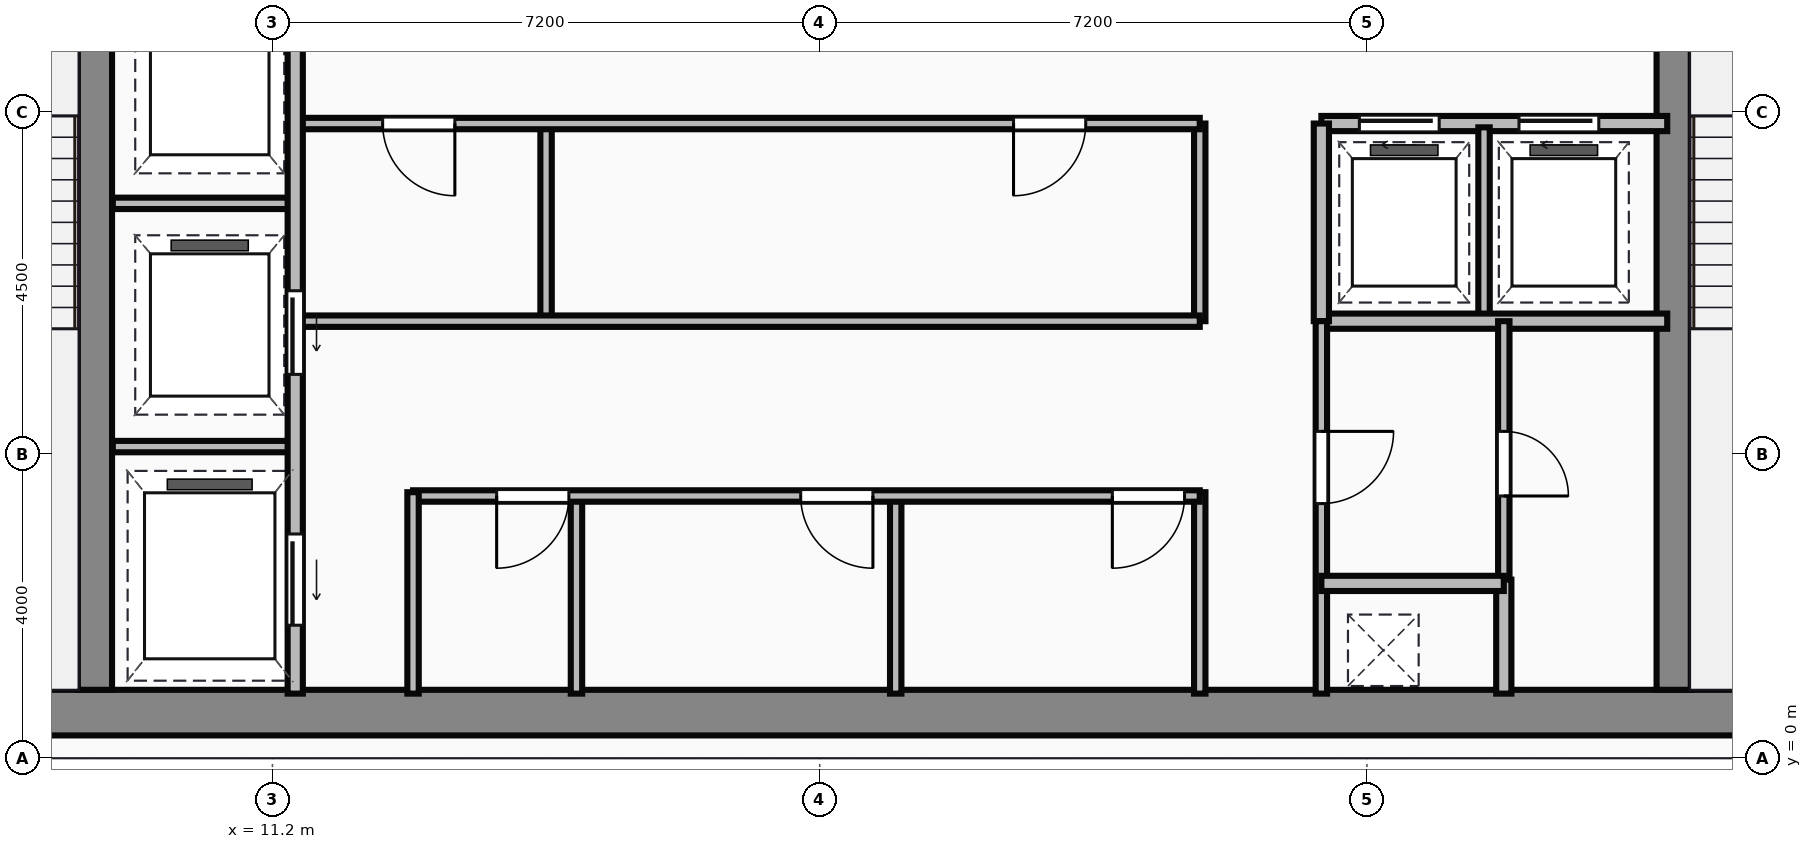
"""IFC4 building model, lengths in metres.
Left out: names, types, materials, properties, quantities, classifications, styles, units other than length and angle.
Written with IfcOpenShell. Run it as: python <this file> out.ifc"""

import sys

from ifc_helpers import new_model, si_unit, direction, frame, frame_2d, origin, place, context, subcontext, project, spatial, rectangle, extrude, source, transform, mapped, element, fill, save


model = new_model("IFC4")
c1 = context("Model", 3, precision=1e-05, world=origin(), true_north=direction((0.0, 1.0)))
c2 = subcontext(c1, "Body", "Model", "MODEL_VIEW")
j1 = project(units=[si_unit("LENGTHUNIT", "METRE"), si_unit("PLANEANGLEUNIT", "RADIAN")], contexts=[c1])
p1 = place(None, origin())
s1 = spatial("IfcSite", under=j1, at=p1, CompositionType="ELEMENT")
p2 = place(p1, origin())
s2 = spatial("IfcBuilding", under=s1, at=p2, CompositionType="ELEMENT")
p3 = place(p2, frame((0.0, 0.0, 206.85)))
s3 = spatial("IfcBuildingStorey", under=s2, at=p3, CompositionType="ELEMENT", Elevation=206.85)
m1 = source(origin(), c2, "Body", "SweptSolid", [
    extrude(rectangle(XDim=29.5, YDim=0.6, at=frame_2d((14.75, 0.0))), origin(), (0.0, 0.0, 1.0), 3.65),
])
p4 = place(p3, frame((4.5, 0.6, 0.0), z_axis=(0.0, 0.0, 1.0), x_axis=(1.0, 0.0, 0.0)))
e1 = element("IfcWall", 1, at=p4, inside=s3, PredefinedType="SHEAR", context=c2, shape_type="MappedRepresentation", body=[
    mapped(m1, transform((0.0, 0.0, 0.0))),
])
m2 = source(origin(), c2, "Body", "SweptSolid", [
    extrude(rectangle(XDim=12.5, YDim=0.45, at=frame_2d((6.25, 0.0))), origin(), (0.0, 0.0, 1.0), 3.65),
])
for number, where, z_axis, x_axis in (
    (2, (8.865, 0.9, 0.0), (0.0, 0.0, 1.0), (0.0, 1.0, 0.0)),
    (3, (29.635, 0.9, 0.0), (0.0, 0.0, 1.0), (0.0, 1.0, 0.0)),
):
    element("IfcWall", number, at=place(p3, frame(where, z_axis=z_axis, x_axis=x_axis)), inside=s3, PredefinedType="SHEAR", context=c2, shape_type="MappedRepresentation", body=[
        mapped(m2, transform((0.0, 0.0, 0.0))),
    ])
m3 = source(origin(), c2, "Body", "SweptSolid", [
    extrude(rectangle(XDim=9.6, YDim=0.2, at=frame_2d((4.8, 0.0))), origin(), (0.0, 0.0, 1.0), 3.4),
])
p5 = place(p3, frame((11.5, 0.85, 0.0), z_axis=(0.0, 0.0, 1.0), x_axis=(0.0, 1.0, 0.0)))
e4 = element("IfcWall", 4, at=p5, inside=s3, PredefinedType="PARTITIONING", context=c2, shape_type="MappedRepresentation", body=[
    mapped(m3, transform((0.0, 0.0, 0.0))),
])
p6 = place(p5, frame((4.2, 0.0, 0.0)))
e5 = element("IfcOpeningElement", 5, at=p6, cuts=e4, PredefinedType="OPENING", context=c2, shape_type="SweptSolid", body=[
    extrude(rectangle(XDim=1.1, YDim=2.15, at=frame_2d((0.55, 1.075))), frame((0.0, 0.11, 0.0), z_axis=(0.0, -1.0, 0.0), x_axis=(1.0, 0.0, 0.0)), (0.0, 0.0, 1.0), 0.22),
])
p7 = place(p5, frame((0.9, 0.0, 0.0)))
e6 = element("IfcOpeningElement", 6, at=p7, cuts=e4, PredefinedType="OPENING", context=c2, shape_type="SweptSolid", body=[
    extrude(rectangle(XDim=1.2, YDim=2.15, at=frame_2d((0.6, 1.075))), frame((0.0, 0.11, 0.0), z_axis=(0.0, -1.0, 0.0), x_axis=(1.0, 0.0, 0.0)), (0.0, 0.0, 1.0), 0.22),
])
m4 = source(origin(), c2, "Body", "SweptSolid", [
    extrude(rectangle(XDim=2.4, YDim=0.15, at=frame_2d((1.2, 0.0))), origin(), (0.0, 0.0, 1.0), 3.4),
])
for number, where, z_axis, x_axis in (
    (7, (9.1, 4.1, 0.0), (0.0, 0.0, 1.0), (1.0, 0.0, 0.0)),
    (8, (9.1, 7.3, 0.0), (0.0, 0.0, 1.0), (1.0, 0.0, 0.0)),
):
    element("IfcWall", number, at=place(p3, frame(where, z_axis=z_axis, x_axis=x_axis)), inside=s3, PredefinedType="PARTITIONING", context=c2, shape_type="MappedRepresentation", body=[
        mapped(m4, transform((0.0, 0.0, 0.0))),
    ])
m5 = source(origin(), c2, "Body", "SweptSolid", [
    extrude(rectangle(XDim=2.65, YDim=0.15, at=frame_2d((1.325, 0.0))), origin(), (0.0, 0.0, 1.0), 3.4),
])
p8 = place(p3, frame((13.05, 0.85, 0.0), z_axis=(0.0, 0.0, 1.0), x_axis=(0.0, 1.0, 0.0)))
e9 = element("IfcWall", 9, at=p8, inside=s3, PredefinedType="PARTITIONING", context=c2, shape_type="MappedRepresentation", body=[
    mapped(m5, transform((0.0, 0.0, 0.0))),
])
m6 = source(origin(), c2, "Body", "SweptSolid", [
    extrude(rectangle(XDim=10.35, YDim=0.15, at=frame_2d((5.175, 0.0))), origin(), (0.0, 0.0, 1.0), 3.4),
])
p9 = place(p3, frame((13.05, 3.45, 0.0), z_axis=(0.0, 0.0, 1.0), x_axis=(1.0, 0.0, 0.0)))
e10 = element("IfcWall", 10, at=p9, inside=s3, PredefinedType="PARTITIONING", context=c2, shape_type="MappedRepresentation", body=[
    mapped(m6, transform((0.0, 0.0, 0.0))),
])
p10 = place(p9, frame((1.1, 0.0, 0.0)))
e11 = element("IfcOpeningElement", 11, at=p10, cuts=e10, PredefinedType="OPENING", context=c2, shape_type="SweptSolid", body=[
    extrude(rectangle(XDim=0.95, YDim=2.15, at=frame_2d((0.475, 1.075))), frame((0.0, 0.085, 0.0), z_axis=(0.0, -1.0, 0.0), x_axis=(1.0, 0.0, 0.0)), (0.0, 0.0, 1.0), 0.17),
])
p11 = place(p9, frame((5.1, 0.0, 0.0)))
e12 = element("IfcOpeningElement", 12, at=p11, cuts=e10, PredefinedType="OPENING", context=c2, shape_type="SweptSolid", body=[
    extrude(rectangle(XDim=0.95, YDim=2.15, at=frame_2d((0.475, 1.075))), frame((0.0, 0.085, 0.0), z_axis=(0.0, -1.0, 0.0), x_axis=(1.0, 0.0, 0.0)), (0.0, 0.0, 1.0), 0.17),
])
p12 = place(p9, frame((9.2, 0.0, 0.0)))
e13 = element("IfcOpeningElement", 13, at=p12, cuts=e10, PredefinedType="OPENING", context=c2, shape_type="SweptSolid", body=[
    extrude(rectangle(XDim=0.95, YDim=2.15, at=frame_2d((0.475, 1.075))), frame((0.0, 0.085, 0.0), z_axis=(0.0, -1.0, 0.0), x_axis=(1.0, 0.0, 0.0)), (0.0, 0.0, 1.0), 0.17),
])
p13 = place(p3, frame((23.4, 0.85, 0.0), z_axis=(0.0, 0.0, 1.0), x_axis=(0.0, 1.0, 0.0)))
e14 = element("IfcWall", 14, at=p13, inside=s3, PredefinedType="PARTITIONING", context=c2, shape_type="MappedRepresentation", body=[
    mapped(m5, transform((0.0, 0.0, 0.0))),
])
m7 = source(origin(), c2, "Body", "SweptSolid", [
    extrude(rectangle(XDim=2.6, YDim=0.15, at=frame_2d((1.3, 0.0))), origin(), (0.0, 0.0, 1.0), 3.4),
])
for number, where, z_axis, x_axis in (
    (15, (15.2, 0.85, 0.0), (0.0, 0.0, 1.0), (0.0, 1.0, 0.0)),
    (16, (19.4, 0.85, 0.0), (0.0, 0.0, 1.0), (0.0, 1.0, 0.0)),
):
    element("IfcWall", number, at=place(p3, frame(where, z_axis=z_axis, x_axis=x_axis)), inside=s3, PredefinedType="PARTITIONING", context=c2, shape_type="MappedRepresentation", body=[
        mapped(m7, transform((0.0, 0.0, 0.0))),
    ])
m8 = source(origin(), c2, "Body", "SweptSolid", [
    extrude(rectangle(XDim=11.85, YDim=0.15, at=frame_2d((5.925, 0.0))), origin(), (0.0, 0.0, 1.0), 3.4),
])
p14 = place(p3, frame((11.55, 5.75, 0.0), z_axis=(0.0, 0.0, 1.0), x_axis=(1.0, 0.0, 0.0)))
e17 = element("IfcWall", 17, at=p14, inside=s3, PredefinedType="PARTITIONING", context=c2, shape_type="MappedRepresentation", body=[
    mapped(m8, transform((0.0, 0.0, 0.0))),
])
p15 = place(p3, frame((11.55, 8.35, 0.0), z_axis=(0.0, 0.0, 1.0), x_axis=(1.0, 0.0, 0.0)))
e18 = element("IfcWall", 18, at=p15, inside=s3, PredefinedType="PARTITIONING", context=c2, shape_type="MappedRepresentation", body=[
    mapped(m8, transform((0.0, 0.0, 0.0))),
])
p16 = place(p15, frame((1.1, 0.0, 0.0)))
e19 = element("IfcOpeningElement", 19, at=p16, cuts=e18, PredefinedType="OPENING", context=c2, shape_type="SweptSolid", body=[
    extrude(rectangle(XDim=0.95, YDim=2.15, at=frame_2d((0.475, 1.075))), frame((0.0, 0.085, 0.0), z_axis=(0.0, -1.0, 0.0), x_axis=(1.0, 0.0, 0.0)), (0.0, 0.0, 1.0), 0.17),
])
p17 = place(p15, frame((9.4, 0.0, 0.0)))
e20 = element("IfcOpeningElement", 20, at=p17, cuts=e18, PredefinedType="OPENING", context=c2, shape_type="SweptSolid", body=[
    extrude(rectangle(XDim=0.95, YDim=2.15, at=frame_2d((0.475, 1.075))), frame((0.0, 0.085, 0.0), z_axis=(0.0, -1.0, 0.0), x_axis=(1.0, 0.0, 0.0)), (0.0, 0.0, 1.0), 0.17),
])
m9 = source(origin(), c2, "Body", "SweptSolid", [
    extrude(rectangle(XDim=2.6, YDim=0.15, at=frame_2d((1.3, 0.0))), origin(), (0.0, 0.0, 1.0), 3.4),
])
p18 = place(p3, frame((23.4, 5.75, 0.0), z_axis=(0.0, 0.0, 1.0), x_axis=(0.0, 1.0, 0.0)))
e21 = element("IfcWall", 21, at=p18, inside=s3, PredefinedType="PARTITIONING", context=c2, shape_type="MappedRepresentation", body=[
    mapped(m9, transform((0.0, 0.0, 0.0))),
])
m10 = source(origin(), c2, "Body", "SweptSolid", [
    extrude(rectangle(XDim=2.5, YDim=0.15, at=frame_2d((1.25, 0.0))), origin(), (0.0, 0.0, 1.0), 3.4),
])
p19 = place(p3, frame((14.8, 5.8, 0.0), z_axis=(0.0, 0.0, 1.0), x_axis=(0.0, 1.0, 0.0)))
e22 = element("IfcWall", 22, at=p19, inside=s3, PredefinedType="PARTITIONING", context=c2, shape_type="MappedRepresentation", body=[
    mapped(m10, transform((0.0, 0.0, 0.0))),
])
m11 = source(origin(), c2, "Body", "SweptSolid", [
    extrude(rectangle(XDim=4.55, YDim=0.2, at=frame_2d((2.275, 0.0))), origin(), (0.0, 0.0, 1.0), 3.4),
])
p20 = place(p3, frame((25.0, 8.35, 0.0), z_axis=(0.0, 0.0, 1.0), x_axis=(1.0, 0.0, 0.0)))
e23 = element("IfcWall", 23, at=p20, inside=s3, PredefinedType="PARTITIONING", context=c2, shape_type="MappedRepresentation", body=[
    mapped(m11, transform((0.0, 0.0, 0.0))),
])
p21 = place(p20, frame((0.5, 0.0, 0.0)))
e24 = element("IfcOpeningElement", 24, at=p21, cuts=e23, PredefinedType="OPENING", context=c2, shape_type="SweptSolid", body=[
    extrude(rectangle(XDim=1.05, YDim=2.15, at=frame_2d((0.525, 1.075))), frame((0.0, 0.11, 0.0), z_axis=(0.0, -1.0, 0.0), x_axis=(1.0, 0.0, 0.0)), (0.0, 0.0, 1.0), 0.22),
])
p22 = place(p20, frame((2.6, 0.0, 0.0)))
e25 = element("IfcOpeningElement", 25, at=p22, cuts=e23, PredefinedType="OPENING", context=c2, shape_type="SweptSolid", body=[
    extrude(rectangle(XDim=1.05, YDim=2.15, at=frame_2d((0.525, 1.075))), frame((0.0, 0.11, 0.0), z_axis=(0.0, -1.0, 0.0), x_axis=(1.0, 0.0, 0.0)), (0.0, 0.0, 1.0), 0.22),
])
p23 = place(p3, frame((25.0, 5.75, 0.0), z_axis=(0.0, 0.0, 1.0), x_axis=(1.0, 0.0, 0.0)))
e26 = element("IfcWall", 26, at=p23, inside=s3, PredefinedType="PARTITIONING", context=c2, shape_type="MappedRepresentation", body=[
    mapped(m11, transform((0.0, 0.0, 0.0))),
])
m12 = source(origin(), c2, "Body", "SweptSolid", [
    extrude(rectangle(XDim=2.6, YDim=0.2, at=frame_2d((1.3, 0.0))), origin(), (0.0, 0.0, 1.0), 3.4),
])
p24 = place(p3, frame((25.0, 5.75, 0.0), z_axis=(0.0, 0.0, 1.0), x_axis=(0.0, 1.0, 0.0)))
e27 = element("IfcWall", 27, at=p24, inside=s3, PredefinedType="PARTITIONING", context=c2, shape_type="MappedRepresentation", body=[
    mapped(m12, transform((0.0, 0.0, 0.0))),
])
p25 = place(p3, frame((27.14, 5.8, 0.0), z_axis=(0.0, 0.0, 1.0), x_axis=(0.0, 1.0, 0.0)))
e28 = element("IfcWall", 28, at=p25, inside=s3, PredefinedType="PARTITIONING", context=c2, shape_type="MappedRepresentation", body=[
    mapped(m10, transform((0.0, 0.0, 0.0))),
])
m13 = source(origin(), c2, "Body", "SweptSolid", [
    extrude(rectangle(XDim=4.9, YDim=0.15, at=frame_2d((2.45, 0.0))), origin(), (0.0, 0.0, 1.0), 3.4),
])
p26 = place(p3, frame((25.0, 0.85, 0.0), z_axis=(0.0, 0.0, 1.0), x_axis=(0.0, 1.0, 0.0)))
e29 = element("IfcWall", 29, at=p26, inside=s3, PredefinedType="PARTITIONING", context=c2, shape_type="MappedRepresentation", body=[
    mapped(m13, transform((0.0, 0.0, 0.0))),
])
p27 = place(p26, frame((2.5, 0.0, 0.0)))
e30 = element("IfcOpeningElement", 30, at=p27, cuts=e29, PredefinedType="OPENING", context=c2, shape_type="SweptSolid", body=[
    extrude(rectangle(XDim=0.95, YDim=2.15, at=frame_2d((0.475, 1.075))), frame((0.0, 0.085, 0.0), z_axis=(0.0, -1.0, 0.0), x_axis=(1.0, 0.0, 0.0)), (0.0, 0.0, 1.0), 0.17),
])
m14 = source(origin(), c2, "Body", "SweptSolid", [
    extrude(rectangle(XDim=2.4, YDim=0.2, at=frame_2d((1.2, 0.0))), origin(), (0.0, 0.0, 1.0), 3.4),
])
p28 = place(p3, frame((25.0, 2.3, 0.0), z_axis=(0.0, 0.0, 1.0), x_axis=(1.0, 0.0, 0.0)))
e31 = element("IfcWall", 31, at=p28, inside=s3, PredefinedType="PARTITIONING", context=c2, shape_type="MappedRepresentation", body=[
    mapped(m14, transform((0.0, 0.0, 0.0))),
])
m15 = source(origin(), c2, "Body", "SweptSolid", [
    extrude(rectangle(XDim=1.5, YDim=0.2, at=frame_2d((0.75, 0.0))), origin(), (0.0, 0.0, 1.0), 3.4),
])
p29 = place(p3, frame((27.4, 0.85, 0.0), z_axis=(0.0, 0.0, 1.0), x_axis=(0.0, 1.0, 0.0)))
e32 = element("IfcWall", 32, at=p29, inside=s3, PredefinedType="PARTITIONING", context=c2, shape_type="MappedRepresentation", body=[
    mapped(m15, transform((0.0, 0.0, 0.0))),
])
m16 = source(origin(), c2, "Body", "SweptSolid", [
    extrude(rectangle(XDim=3.4, YDim=0.15, at=frame_2d((1.7, 0.0))), origin(), (0.0, 0.0, 1.0), 3.4),
])
p30 = place(p3, frame((27.4, 2.35, 0.0), z_axis=(0.0, 0.0, 1.0), x_axis=(0.0, 1.0, 0.0)))
e33 = element("IfcWall", 33, at=p30, inside=s3, PredefinedType="PARTITIONING", context=c2, shape_type="MappedRepresentation", body=[
    mapped(m16, transform((0.0, 0.0, 0.0))),
])
p31 = place(p30, frame((1.1, 0.0, 0.0)))
e34 = element("IfcOpeningElement", 34, at=p31, cuts=e33, PredefinedType="OPENING", context=c2, shape_type="SweptSolid", body=[
    extrude(rectangle(XDim=0.85, YDim=2.1, at=frame_2d((0.425, 1.05))), frame((0.0, 0.085, 0.0), z_axis=(0.0, -1.0, 0.0), x_axis=(1.0, 0.0, 0.0)), (0.0, 0.0, 1.0), 0.17),
])
m17 = source(origin(), c2, "Body", "SweptSolid", [
    extrude(rectangle(XDim=1.1, YDim=2.15, at=frame_2d((0.55, 1.075))), frame((0.0, 0.025, 0.0), z_axis=(0.0, -1.0, 0.0), x_axis=(1.0, 0.0, 0.0)), (0.0, 0.0, 1.0), 0.05),
])
p32 = place(p6, frame((1.1, 0.0, 0.0), z_axis=(0.0, 0.0, 1.0), x_axis=(-1.0, 0.0, 0.0)))
e35 = element("IfcDoor", 35, at=p32, inside=s3, OperationType="SLIDING_TO_LEFT", PredefinedType="DOOR", context=c2, shape_type="MappedRepresentation", body=[
    mapped(m17, transform((0.0, 0.0, 0.0))),
])
fill(e5, e35)
m18 = source(origin(), c2, "Body", "SweptSolid", [
    extrude(rectangle(XDim=1.2, YDim=2.15, at=frame_2d((0.6, 1.075))), frame((0.0, 0.025, 0.0), z_axis=(0.0, -1.0, 0.0), x_axis=(1.0, 0.0, 0.0)), (0.0, 0.0, 1.0), 0.05),
])
p33 = place(p7, frame((1.2, 0.0, 0.0), z_axis=(0.0, 0.0, 1.0), x_axis=(-1.0, 0.0, 0.0)))
e36 = element("IfcDoor", 36, at=p33, inside=s3, OperationType="SLIDING_TO_LEFT", PredefinedType="DOOR", context=c2, shape_type="MappedRepresentation", body=[
    mapped(m18, transform((0.0, 0.0, 0.0))),
])
fill(e6, e36)
m19 = source(origin(), c2, "Body", "SweptSolid", [
    extrude(rectangle(XDim=0.95, YDim=2.15, at=frame_2d((0.475, 1.075))), frame((0.0, 0.025, 0.0), z_axis=(0.0, -1.0, 0.0), x_axis=(1.0, 0.0, 0.0)), (0.0, 0.0, 1.0), 0.05),
])
p34 = place(p10, origin())
e37 = element("IfcDoor", 37, at=p34, inside=s3, OperationType="SINGLE_SWING_LEFT", PredefinedType="DOOR", context=c2, shape_type="MappedRepresentation", body=[
    mapped(m19, transform((0.0, 0.0, 0.0))),
])
fill(e11, e37)
p35 = place(p11, origin())
e38 = element("IfcDoor", 38, at=p35, inside=s3, OperationType="SINGLE_SWING_RIGHT", PredefinedType="DOOR", context=c2, shape_type="MappedRepresentation", body=[
    mapped(m19, transform((0.0, 0.0, 0.0))),
])
fill(e12, e38)
p36 = place(p12, origin())
e39 = element("IfcDoor", 39, at=p36, inside=s3, OperationType="SINGLE_SWING_LEFT", PredefinedType="DOOR", context=c2, shape_type="MappedRepresentation", body=[
    mapped(m19, transform((0.0, 0.0, 0.0))),
])
fill(e13, e39)
p37 = place(p16, origin())
e40 = element("IfcDoor", 40, at=p37, inside=s3, OperationType="SINGLE_SWING_RIGHT", PredefinedType="DOOR", context=c2, shape_type="MappedRepresentation", body=[
    mapped(m19, transform((0.0, 0.0, 0.0))),
])
fill(e19, e40)
p38 = place(p17, origin())
e41 = element("IfcDoor", 41, at=p38, inside=s3, OperationType="SINGLE_SWING_LEFT", PredefinedType="DOOR", context=c2, shape_type="MappedRepresentation", body=[
    mapped(m19, transform((0.0, 0.0, 0.0))),
])
fill(e20, e41)
m20 = source(origin(), c2, "Body", "SweptSolid", [
    extrude(rectangle(XDim=1.05, YDim=2.15, at=frame_2d((0.525, 1.075))), frame((0.0, 0.025, 0.0), z_axis=(0.0, -1.0, 0.0), x_axis=(1.0, 0.0, 0.0)), (0.0, 0.0, 1.0), 0.05),
])
p39 = place(p21, origin())
e42 = element("IfcDoor", 42, at=p39, inside=s3, OperationType="SLIDING_TO_LEFT", PredefinedType="DOOR", context=c2, shape_type="MappedRepresentation", body=[
    mapped(m20, transform((0.0, 0.0, 0.0))),
])
fill(e24, e42)
p40 = place(p22, origin())
e43 = element("IfcDoor", 43, at=p40, inside=s3, OperationType="SLIDING_TO_LEFT", PredefinedType="DOOR", context=c2, shape_type="MappedRepresentation", body=[
    mapped(m20, transform((0.0, 0.0, 0.0))),
])
fill(e25, e43)
p41 = place(p27, origin())
e44 = element("IfcDoor", 44, at=p41, inside=s3, OperationType="SINGLE_SWING_RIGHT", PredefinedType="DOOR", context=c2, shape_type="MappedRepresentation", body=[
    mapped(m19, transform((0.0, 0.0, 0.0))),
])
fill(e30, e44)
m21 = source(origin(), c2, "Body", "SweptSolid", [
    extrude(rectangle(XDim=0.85, YDim=2.1, at=frame_2d((0.425, 1.05))), frame((0.0, 0.025, 0.0), z_axis=(0.0, -1.0, 0.0), x_axis=(1.0, 0.0, 0.0)), (0.0, 0.0, 1.0), 0.05),
])
p42 = place(p31, frame((0.85, 0.0, 0.0), z_axis=(0.0, 0.0, 1.0), x_axis=(-1.0, 0.0, 0.0)))
e45 = element("IfcDoor", 45, at=p42, inside=s3, OperationType="SINGLE_SWING_LEFT", PredefinedType="DOOR", context=c2, shape_type="MappedRepresentation", body=[
    mapped(m21, transform((0.0, 0.0, 0.0))),
])
fill(e34, e45)
save(model, sys.argv[1])
